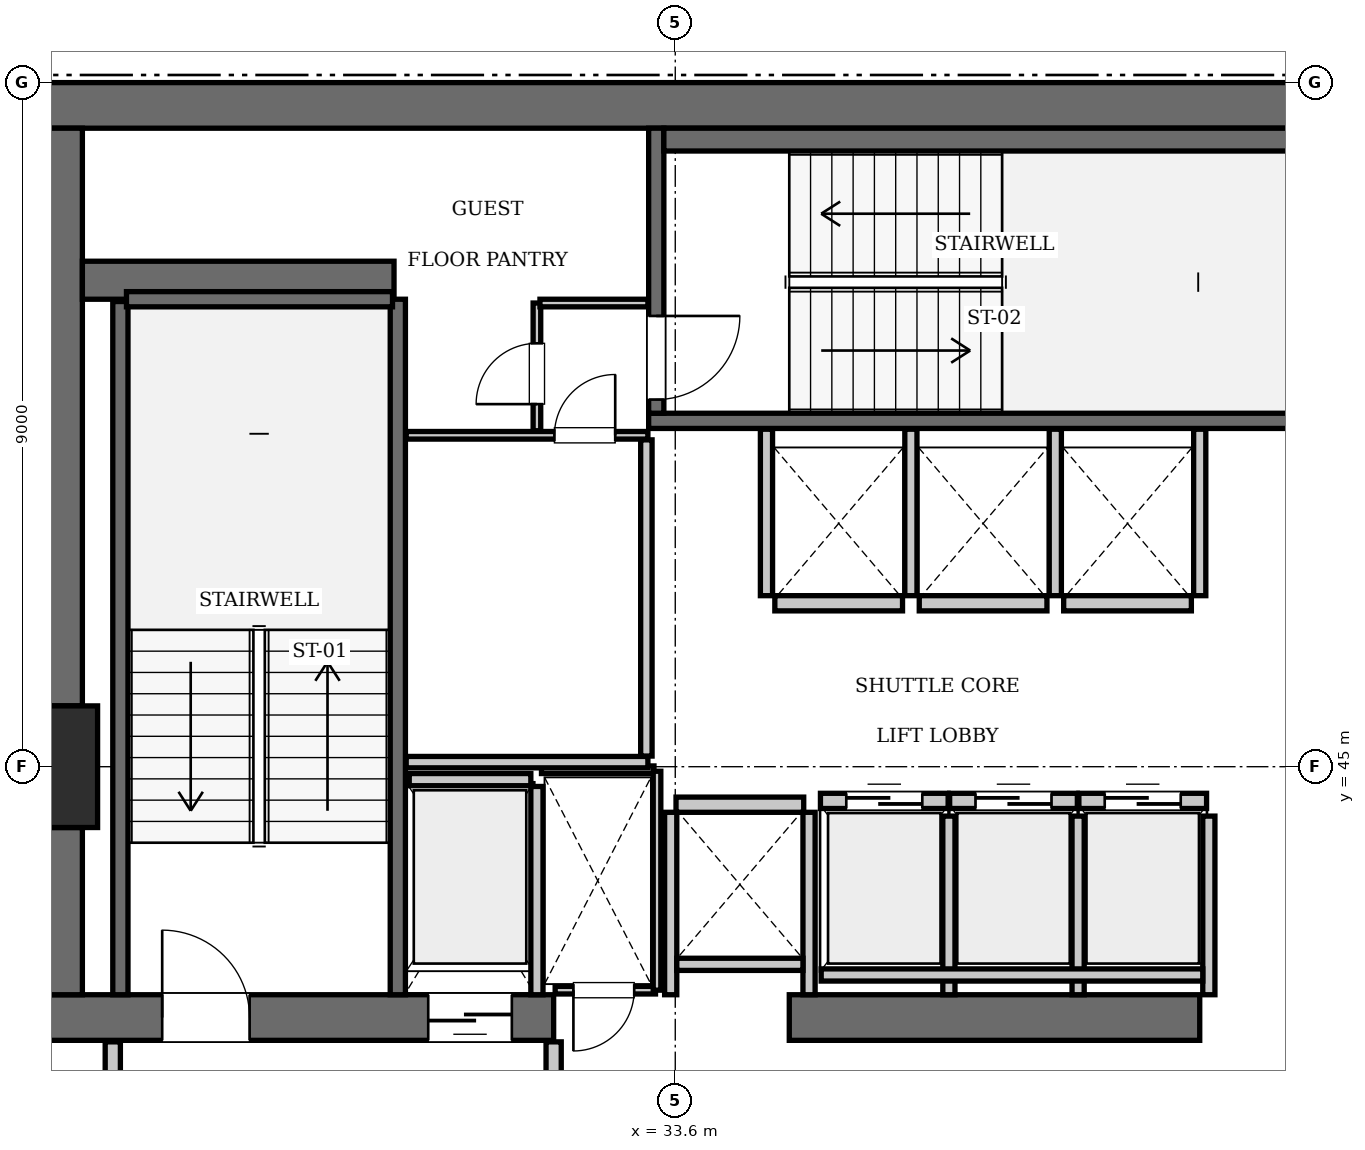
"""IFC4 building model, lengths in metres.
Left out: names, types, materials, properties, quantities, classifications, styles, units other than length and angle.
Written with IfcOpenShell. Run it as: python <this file> out.ifc"""

import sys

from ifc_helpers import new_model, si_unit, direction, frame, frame_2d, origin, origin_2d, place, context, subcontext, project, spatial, rectangle, extrude, element, fill, save


model = new_model("IFC4")
c1 = context("Model", 3, precision=1e-05, world=origin(), true_north=direction((0.0, 1.0)))
c2 = subcontext(c1, "Body", "Model", "MODEL_VIEW")
j1 = project(units=[si_unit("LENGTHUNIT", "METRE"), si_unit("PLANEANGLEUNIT", "RADIAN")], contexts=[c1])
p1 = place(None, origin())
s1 = spatial("IfcSite", under=j1, at=p1, CompositionType="ELEMENT")
p2 = place(p1, origin())
s2 = spatial("IfcBuilding", under=s1, at=p2, CompositionType="ELEMENT")
p3 = place(p2, frame((0.0, 0.0, 308.7)))
s3 = spatial("IfcBuildingStorey", under=s2, at=p3, CompositionType="ELEMENT", Elevation=308.7)
p4 = place(p3, frame((25.2, 45.0, 0.0), z_axis=(0.0, 0.0, 1.0), x_axis=(1.0, 0.0, 0.0)))
e1 = element("IfcColumn", 1, at=p4, inside=s3, PredefinedType="COLUMN", context=c2, shape_type="SweptSolid", body=[
    extrude(rectangle(XDim=1.6, YDim=1.6, at=origin_2d()), origin(), (0.0, 0.0, 1.0), 3.85),
])
p5 = place(p3, frame((25.2, 53.7, 0.0), z_axis=(0.0, 0.0, 1.0), x_axis=(1.0, 0.0, 0.0)))
e2 = element("IfcWall", 2, at=p5, inside=s3, PredefinedType="SHEAR", context=c2, shape_type="SweptSolid", body=[
    extrude(rectangle(XDim=25.2, YDim=0.6, at=frame_2d((12.6, 0.0))), origin(), (0.0, 0.0, 1.0), 3.85),
])
p6 = place(p3, frame((25.2, 41.7, 0.0), z_axis=(0.0, 0.0, 1.0), x_axis=(1.0, 0.0, 0.0)))
e3 = element("IfcWall", 3, at=p6, inside=s3, PredefinedType="SHEAR", context=c2, shape_type="SweptSolid", body=[
    extrude(rectangle(XDim=6.8, YDim=0.6, at=frame_2d((3.4, 0.0))), origin(), (0.0, 0.0, 1.0), 3.85),
])
p7 = place(p6, frame((1.65, 0.0, 0.0)))
e4 = element("IfcOpeningElement", 4, at=p7, cuts=e3, PredefinedType="OPENING", context=c2, shape_type="SweptSolid", body=[
    extrude(rectangle(XDim=1.15, YDim=2.15, at=frame_2d((0.575, 1.075))), frame((0.0, 0.31, 0.0), z_axis=(0.0, -1.0, 0.0), x_axis=(1.0, 0.0, 0.0)), (0.0, 0.0, 1.0), 0.62),
])
p8 = place(p6, frame((5.15, 0.0, 0.0)))
e5 = element("IfcOpeningElement", 5, at=p8, cuts=e3, PredefinedType="OPENING", context=c2, shape_type="SweptSolid", body=[
    extrude(rectangle(XDim=1.1, YDim=2.2, at=frame_2d((0.55, 1.1))), frame((0.0, 0.31, 0.0), z_axis=(0.0, -1.0, 0.0), x_axis=(1.0, 0.0, 0.0)), (0.0, 0.0, 1.0), 0.62),
])
p9 = place(p3, frame((35.1, 41.7, 0.0), z_axis=(0.0, 0.0, 1.0), x_axis=(1.0, 0.0, 0.0)))
e6 = element("IfcWall", 6, at=p9, inside=s3, PredefinedType="SHEAR", context=c2, shape_type="SweptSolid", body=[
    extrude(rectangle(XDim=5.4, YDim=0.6, at=frame_2d((2.7, 0.0))), origin(), (0.0, 0.0, 1.0), 3.85),
])
p10 = place(p3, frame((25.5, 42.0, 0.0), z_axis=(0.0, 0.0, 1.0), x_axis=(0.0, 1.0, 0.0)))
e7 = element("IfcWall", 7, at=p10, inside=s3, PredefinedType="SHEAR", context=c2, shape_type="SweptSolid", body=[
    extrude(rectangle(XDim=2.2, YDim=0.6, at=frame_2d((1.1, 0.0))), origin(), (0.0, 0.0, 1.0), 3.85),
])
p11 = place(p3, frame((25.5, 45.8, 0.0), z_axis=(0.0, 0.0, 1.0), x_axis=(0.0, 1.0, 0.0)))
e8 = element("IfcWall", 8, at=p11, inside=s3, PredefinedType="SHEAR", context=c2, shape_type="SweptSolid", body=[
    extrude(rectangle(XDim=7.6, YDim=0.6, at=frame_2d((3.8, 0.0))), origin(), (0.0, 0.0, 1.0), 3.85),
])
p12 = place(p3, frame((25.8, 51.4, 0.0), z_axis=(0.0, 0.0, 1.0), x_axis=(1.0, 0.0, 0.0)))
e9 = element("IfcWall", 9, at=p12, inside=s3, PredefinedType="SHEAR", context=c2, shape_type="SweptSolid", body=[
    extrude(rectangle(XDim=4.1, YDim=0.5, at=frame_2d((2.05, 0.0))), origin(), (0.0, 0.0, 1.0), 3.85),
])
p13 = place(p3, frame((29.95, 42.0, 0.0), z_axis=(0.0, 0.0, 1.0), x_axis=(0.0, 1.0, 0.0)))
e10 = element("IfcWall", 10, at=p13, inside=s3, PredefinedType="SOLIDWALL", context=c2, shape_type="SweptSolid", body=[
    extrude(rectangle(XDim=9.15, YDim=0.2, at=frame_2d((4.575, 0.0))), origin(), (0.0, 0.0, 1.0), 3.61),
])
p14 = place(p3, frame((26.3, 42.0, 0.0), z_axis=(0.0, 0.0, 1.0), x_axis=(0.0, 1.0, 0.0)))
e11 = element("IfcWall", 11, at=p14, inside=s3, PredefinedType="SOLIDWALL", context=c2, shape_type="SweptSolid", body=[
    extrude(rectangle(XDim=9.12, YDim=0.2, at=frame_2d((4.56, 0.0))), origin(), (0.0, 0.0, 1.0), 3.61),
])
p15 = place(p3, frame((26.38, 51.15, 0.0), z_axis=(0.0, 0.0, 1.0), x_axis=(1.0, 0.0, 0.0)))
e12 = element("IfcWall", 12, at=p15, inside=s3, PredefinedType="SOLIDWALL", context=c2, shape_type="SweptSolid", body=[
    extrude(rectangle(XDim=3.5, YDim=0.2, at=frame_2d((1.75, 0.0))), origin(), (0.0, 0.0, 1.0), 3.61),
])
p16 = place(p3, frame((33.25, 49.55, 0.0), z_axis=(0.0, 0.0, 1.0), x_axis=(1.0, 0.0, 0.0)))
e13 = element("IfcWall", 13, at=p16, inside=s3, PredefinedType="SOLIDWALL", context=c2, shape_type="SweptSolid", body=[
    extrude(rectangle(XDim=9.1, YDim=0.2, at=frame_2d((4.55, 0.0))), origin(), (0.0, 0.0, 1.0), 3.61),
])
p17 = place(p3, frame((33.35, 49.65, 0.0), z_axis=(0.0, 0.0, 1.0), x_axis=(0.0, 1.0, 0.0)))
e14 = element("IfcWall", 14, at=p17, inside=s3, PredefinedType="SOLIDWALL", context=c2, shape_type="SweptSolid", body=[
    extrude(rectangle(XDim=3.75, YDim=0.2, at=frame_2d((1.875, 0.0))), origin(), (0.0, 0.0, 1.0), 3.61),
])
p18 = place(p17, frame((0.18, 0.0, 0.0)))
e15 = element("IfcOpeningElement", 15, at=p18, cuts=e14, PredefinedType="OPENING", context=c2, shape_type="SweptSolid", body=[
    extrude(rectangle(XDim=1.1, YDim=2.15, at=frame_2d((0.55, 1.075))), frame((0.0, 0.11, 0.0), z_axis=(0.0, -1.0, 0.0), x_axis=(1.0, 0.0, 0.0)), (0.0, 0.0, 1.0), 0.22),
])
p19 = place(p3, frame((33.45, 53.25, 0.0), z_axis=(0.0, 0.0, 1.0), x_axis=(1.0, 0.0, 0.0)))
e16 = element("IfcWall", 16, at=p19, inside=s3, PredefinedType="SOLIDWALL", context=c2, shape_type="SweptSolid", body=[
    extrude(rectangle(XDim=8.7, YDim=0.3, at=frame_2d((4.35, 0.0))), origin(), (0.0, 0.0, 1.0), 3.61),
])
p20 = place(p3, frame((35.51, 44.55, 0.0), z_axis=(0.0, 0.0, 1.0), x_axis=(1.0, 0.0, 0.0)))
e17 = element("IfcWall", 17, at=p20, inside=s3, PredefinedType="SOLIDWALL", context=c2, shape_type="SweptSolid", body=[
    extrude(rectangle(XDim=1.68, YDim=0.2, at=frame_2d((0.84, 0.0))), origin(), (0.0, 0.0, 1.0), 3.61),
])
p21 = place(p20, frame((0.34, 0.0, 0.0)))
e18 = element("IfcOpeningElement", 18, at=p21, cuts=e17, PredefinedType="OPENING", context=c2, shape_type="SweptSolid", body=[
    extrude(rectangle(XDim=1.0, YDim=2.15, at=frame_2d((0.5, 1.075))), frame((0.0, 0.11, 0.0), z_axis=(0.0, -1.0, 0.0), x_axis=(1.0, 0.0, 0.0)), (0.0, 0.0, 1.0), 0.22),
])
p22 = place(p3, frame((37.21, 44.55, 0.0), z_axis=(0.0, 0.0, 1.0), x_axis=(1.0, 0.0, 0.0)))
e19 = element("IfcWall", 19, at=p22, inside=s3, PredefinedType="SOLIDWALL", context=c2, shape_type="SweptSolid", body=[
    extrude(rectangle(XDim=1.68, YDim=0.2, at=frame_2d((0.84, 0.0))), origin(), (0.0, 0.0, 1.0), 3.61),
])
p23 = place(p22, frame((0.34, 0.0, 0.0)))
e20 = element("IfcOpeningElement", 20, at=p23, cuts=e19, PredefinedType="OPENING", context=c2, shape_type="SweptSolid", body=[
    extrude(rectangle(XDim=1.0, YDim=2.15, at=frame_2d((0.5, 1.075))), frame((0.0, 0.11, 0.0), z_axis=(0.0, -1.0, 0.0), x_axis=(1.0, 0.0, 0.0)), (0.0, 0.0, 1.0), 0.22),
])
p24 = place(p3, frame((38.91, 44.55, 0.0), z_axis=(0.0, 0.0, 1.0), x_axis=(1.0, 0.0, 0.0)))
e21 = element("IfcWall", 21, at=p24, inside=s3, PredefinedType="SOLIDWALL", context=c2, shape_type="SweptSolid", body=[
    extrude(rectangle(XDim=1.68, YDim=0.2, at=frame_2d((0.84, 0.0))), origin(), (0.0, 0.0, 1.0), 3.61),
])
p25 = place(p24, frame((0.34, 0.0, 0.0)))
e22 = element("IfcOpeningElement", 22, at=p25, cuts=e21, PredefinedType="OPENING", context=c2, shape_type="SweptSolid", body=[
    extrude(rectangle(XDim=1.0, YDim=2.15, at=frame_2d((0.5, 1.075))), frame((0.0, 0.11, 0.0), z_axis=(0.0, -1.0, 0.0), x_axis=(1.0, 0.0, 0.0)), (0.0, 0.0, 1.0), 0.22),
])
p26 = place(p3, frame((34.91, 47.15, 0.0), z_axis=(0.0, 0.0, 1.0), x_axis=(1.0, 0.0, 0.0)))
e23 = element("IfcWall", 23, at=p26, inside=s3, PredefinedType="SOLIDWALL", context=c2, shape_type="SweptSolid", body=[
    extrude(rectangle(XDim=1.68, YDim=0.2, at=frame_2d((0.84, 0.0))), origin(), (0.0, 0.0, 1.0), 3.61),
])
for number, where, z_axis, x_axis in (
    (24, (36.81, 47.15, 0.0), (0.0, 0.0, 1.0), (1.0, 0.0, 0.0)),
    (25, (38.71, 47.15, 0.0), (0.0, 0.0, 1.0), (1.0, 0.0, 0.0)),
    (26, (33.61, 44.5, 0.0), (0.0, 0.0, 1.0), (1.0, 0.0, 0.0)),
):
    element("IfcWall", number, at=place(p3, frame(where, z_axis=z_axis, x_axis=x_axis)), inside=s3, PredefinedType="SOLIDWALL", context=c2, shape_type="SweptSolid", body=[
        extrude(rectangle(XDim=1.68, YDim=0.2, at=frame_2d((0.84, 0.0))), origin(), (0.0, 0.0, 1.0), 3.61),
    ])
p27 = place(p3, frame((30.1, 44.83, 0.0), z_axis=(0.0, 0.0, 1.0), x_axis=(1.0, 0.0, 0.0)))
e27 = element("IfcWall", 27, at=p27, inside=s3, PredefinedType="SOLIDWALL", context=c2, shape_type="SweptSolid", body=[
    extrude(rectangle(XDim=1.6, YDim=0.16, at=frame_2d((0.8, 0.0))), origin(), (0.0, 0.0, 1.0), 3.61),
])
p28 = place(p3, frame((31.78, 42.0, 0.0), z_axis=(0.0, 0.0, 1.0), x_axis=(0.0, 1.0, 0.0)))
e28 = element("IfcWall", 28, at=p28, inside=s3, PredefinedType="SOLIDWALL", context=c2, shape_type="SweptSolid", body=[
    extrude(rectangle(XDim=2.74, YDim=0.16, at=frame_2d((1.37, 0.0))), origin(), (0.0, 0.0, 1.0), 3.61),
])
for number, where, z_axis, x_axis in (
    (29, (37.2, 42.0, 0.0), (0.0, 0.0, 1.0), (0.0, 1.0, 0.0)),
    (30, (38.9, 42.0, 0.0), (0.0, 0.0, 1.0), (0.0, 1.0, 0.0)),
    (31, (40.62, 42.0, 0.0), (0.0, 0.0, 1.0), (0.0, 1.0, 0.0)),
):
    element("IfcWall", number, at=place(p3, frame(where, z_axis=z_axis, x_axis=x_axis)), inside=s3, PredefinedType="SOLIDWALL", context=c2, shape_type="SweptSolid", body=[
        extrude(rectangle(XDim=2.35, YDim=0.16, at=frame_2d((1.175, 0.0))), origin(), (0.0, 0.0, 1.0), 3.61),
    ])
p29 = place(p3, frame((35.52, 42.26, 0.0), z_axis=(0.0, 0.0, 1.0), x_axis=(1.0, 0.0, 0.0)))
e32 = element("IfcWall", 32, at=p29, inside=s3, PredefinedType="SOLIDWALL", context=c2, shape_type="SweptSolid", body=[
    extrude(rectangle(XDim=5.02, YDim=0.16, at=frame_2d((2.51, 0.0))), origin(), (0.0, 0.0, 1.0), 3.61),
])
for number, where, z_axis, x_axis in (
    (33, (34.8, 47.25, 0.0), (0.0, 0.0, 1.0), (0.0, 1.0, 0.0)),
    (34, (36.7, 47.25, 0.0), (0.0, 0.0, 1.0), (0.0, 1.0, 0.0)),
    (35, (38.6, 47.25, 0.0), (0.0, 0.0, 1.0), (0.0, 1.0, 0.0)),
    (36, (40.5, 47.25, 0.0), (0.0, 0.0, 1.0), (0.0, 1.0, 0.0)),
):
    element("IfcWall", number, at=place(p3, frame(where, z_axis=z_axis, x_axis=x_axis)), inside=s3, PredefinedType="SOLIDWALL", context=c2, shape_type="SweptSolid", body=[
        extrude(rectangle(XDim=2.19, YDim=0.16, at=frame_2d((1.095, 0.0))), origin(), (0.0, 0.0, 1.0), 3.61),
    ])
for number, where, z_axis, x_axis in (
    (37, (33.54, 42.0, 0.0), (0.0, 0.0, 1.0), (0.0, 1.0, 0.0)),
    (38, (35.36, 42.0, 0.0), (0.0, 0.0, 1.0), (0.0, 1.0, 0.0)),
):
    element("IfcWall", number, at=place(p3, frame(where, z_axis=z_axis, x_axis=x_axis)), inside=s3, PredefinedType="SOLIDWALL", context=c2, shape_type="SweptSolid", body=[
        extrude(rectangle(XDim=2.4, YDim=0.16, at=frame_2d((1.2, 0.0))), origin(), (0.0, 0.0, 1.0), 3.61),
    ])
p30 = place(p3, frame((33.62, 42.4, 0.0), z_axis=(0.0, 0.0, 1.0), x_axis=(1.0, 0.0, 0.0)))
e39 = element("IfcWall", 39, at=p30, inside=s3, PredefinedType="SOLIDWALL", context=c2, shape_type="SweptSolid", body=[
    extrude(rectangle(XDim=1.66, YDim=0.16, at=frame_2d((0.83, 0.0))), origin(), (0.0, 0.0, 1.0), 3.61),
])
for number, where, z_axis, x_axis in (
    (40, (26.2, 38.31, 0.0), (0.0, 0.0, 1.0), (0.0, 1.0, 0.0)),
    (41, (32.0, 38.31, 0.0), (0.0, 0.0, 1.0), (0.0, 1.0, 0.0)),
):
    element("IfcWall", number, at=place(p3, frame(where, z_axis=z_axis, x_axis=x_axis)), inside=s3, PredefinedType="PARTITIONING", context=c2, shape_type="SweptSolid", body=[
        extrude(rectangle(XDim=3.07, YDim=0.2, at=frame_2d((1.535, 0.0))), origin(), (0.0, 0.0, 1.0), 3.61),
    ])
p31 = place(p3, frame((32.02, 42.06, 0.0), z_axis=(0.0, 0.0, 1.0), x_axis=(1.0, 0.0, 0.0)))
e42 = element("IfcWall", 42, at=p31, inside=s3, PredefinedType="PARTITIONING", context=c2, shape_type="SweptSolid", body=[
    extrude(rectangle(XDim=1.32, YDim=0.1, at=frame_2d((0.66, 0.0))), origin(), (0.0, 0.0, 1.0), 3.61),
])
p32 = place(p31, frame((0.24, 0.0, 0.0)))
e43 = element("IfcOpeningElement", 43, at=p32, cuts=e42, PredefinedType="OPENING", context=c2, shape_type="SweptSolid", body=[
    extrude(rectangle(XDim=0.8, YDim=2.05, at=frame_2d((0.4, 1.025))), frame((0.0, 0.06, 0.0), z_axis=(0.0, -1.0, 0.0), x_axis=(1.0, 0.0, 0.0)), (0.0, 0.0, 1.0), 0.12),
])
p33 = place(p3, frame((31.84, 44.96, 0.0), z_axis=(0.0, 0.0, 1.0), x_axis=(1.0, 0.0, 0.0)))
e44 = element("IfcWall", 44, at=p33, inside=s3, PredefinedType="PARTITIONING", context=c2, shape_type="SweptSolid", body=[
    extrude(rectangle(XDim=1.48, YDim=0.1, at=frame_2d((0.74, 0.0))), origin(), (0.0, 0.0, 1.0), 3.61),
])
p34 = place(p3, frame((33.36, 42.06, 0.0), z_axis=(0.0, 0.0, 1.0), x_axis=(0.0, 1.0, 0.0)))
e45 = element("IfcWall", 45, at=p34, inside=s3, PredefinedType="PARTITIONING", context=c2, shape_type="SweptSolid", body=[
    extrude(rectangle(XDim=2.88, YDim=0.1, at=frame_2d((1.44, 0.0))), origin(), (0.0, 0.0, 1.0), 3.61),
])
p35 = place(p3, frame((30.06, 45.06, 0.0), z_axis=(0.0, 0.0, 1.0), x_axis=(1.0, 0.0, 0.0)))
e46 = element("IfcWall", 46, at=p35, inside=s3, PredefinedType="PARTITIONING", context=c2, shape_type="SweptSolid", body=[
    extrude(rectangle(XDim=3.18, YDim=0.15, at=frame_2d((1.59, 0.0))), origin(), (0.0, 0.0, 1.0), 3.61),
])
p36 = place(p3, frame((33.22, 45.14, 0.0), z_axis=(0.0, 0.0, 1.0), x_axis=(0.0, 1.0, 0.0)))
e47 = element("IfcWall", 47, at=p36, inside=s3, PredefinedType="PARTITIONING", context=c2, shape_type="SweptSolid", body=[
    extrude(rectangle(XDim=4.16, YDim=0.15, at=frame_2d((2.08, 0.0))), origin(), (0.0, 0.0, 1.0), 3.61),
])
p37 = place(p3, frame((30.06, 49.36, 0.0), z_axis=(0.0, 0.0, 1.0), x_axis=(1.0, 0.0, 0.0)))
e48 = element("IfcWall", 48, at=p37, inside=s3, PredefinedType="PARTITIONING", context=c2, shape_type="SweptSolid", body=[
    extrude(rectangle(XDim=3.18, YDim=0.1, at=frame_2d((1.59, 0.0))), origin(), (0.0, 0.0, 1.0), 3.61),
])
p38 = place(p37, frame((1.95, 0.0, 0.0)))
e49 = element("IfcOpeningElement", 49, at=p38, cuts=e48, PredefinedType="OPENING", context=c2, shape_type="SweptSolid", body=[
    extrude(rectangle(XDim=0.8, YDim=2.05, at=frame_2d((0.4, 1.025))), frame((0.0, 0.06, 0.0), z_axis=(0.0, -1.0, 0.0), x_axis=(1.0, 0.0, 0.0)), (0.0, 0.0, 1.0), 0.12),
])
p39 = place(p3, frame((31.78, 49.42, 0.0), z_axis=(0.0, 0.0, 1.0), x_axis=(0.0, 1.0, 0.0)))
e50 = element("IfcWall", 50, at=p39, inside=s3, PredefinedType="PARTITIONING", context=c2, shape_type="SweptSolid", body=[
    extrude(rectangle(XDim=1.68, YDim=0.1, at=frame_2d((0.84, 0.0))), origin(), (0.0, 0.0, 1.0), 3.61),
])
p40 = place(p39, frame((0.35, 0.0, 0.0)))
e51 = element("IfcOpeningElement", 51, at=p40, cuts=e50, PredefinedType="OPENING", context=c2, shape_type="SweptSolid", body=[
    extrude(rectangle(XDim=0.8, YDim=2.05, at=frame_2d((0.4, 1.025))), frame((0.0, 0.06, 0.0), z_axis=(0.0, -1.0, 0.0), x_axis=(1.0, 0.0, 0.0)), (0.0, 0.0, 1.0), 0.12),
])
p41 = place(p3, frame((31.82, 51.1, 0.0), z_axis=(0.0, 0.0, 1.0), x_axis=(1.0, 0.0, 0.0)))
e52 = element("IfcWall", 52, at=p41, inside=s3, PredefinedType="PARTITIONING", context=c2, shape_type="SweptSolid", body=[
    extrude(rectangle(XDim=1.42, YDim=0.1, at=frame_2d((0.71, 0.0))), origin(), (0.0, 0.0, 1.0), 3.61),
])
p42 = place(p7, origin())
e53 = element("IfcDoor", 53, at=p42, inside=s3, OperationType="SINGLE_SWING_LEFT", PredefinedType="DOOR", context=c2, shape_type="SweptSolid", body=[
    extrude(rectangle(XDim=1.15, YDim=2.15, at=frame_2d((0.575, 1.075))), frame((0.0, 0.025, 0.0), z_axis=(0.0, -1.0, 0.0), x_axis=(1.0, 0.0, 0.0)), (0.0, 0.0, 1.0), 0.05),
])
fill(e4, e53)
p43 = place(p18, frame((1.1, 0.0, 0.0), z_axis=(0.0, 0.0, 1.0), x_axis=(-1.0, 0.0, 0.0)))
e54 = element("IfcDoor", 54, at=p43, inside=s3, OperationType="SINGLE_SWING_LEFT", PredefinedType="DOOR", context=c2, shape_type="SweptSolid", body=[
    extrude(rectangle(XDim=1.1, YDim=2.15, at=frame_2d((0.55, 1.075))), frame((0.0, 0.025, 0.0), z_axis=(0.0, -1.0, 0.0), x_axis=(1.0, 0.0, 0.0)), (0.0, 0.0, 1.0), 0.05),
])
fill(e15, e54)
p44 = place(p21, origin())
e55 = element("IfcDoor", 55, at=p44, inside=s3, OperationType="SLIDING_TO_LEFT", PredefinedType="DOOR", context=c2, shape_type="SweptSolid", body=[
    extrude(rectangle(XDim=1.0, YDim=2.15, at=frame_2d((0.5, 1.075))), frame((0.0, 0.025, 0.0), z_axis=(0.0, -1.0, 0.0), x_axis=(1.0, 0.0, 0.0)), (0.0, 0.0, 1.0), 0.05),
])
fill(e18, e55)
p45 = place(p23, origin())
e56 = element("IfcDoor", 56, at=p45, inside=s3, OperationType="SLIDING_TO_LEFT", PredefinedType="DOOR", context=c2, shape_type="SweptSolid", body=[
    extrude(rectangle(XDim=1.0, YDim=2.15, at=frame_2d((0.5, 1.075))), frame((0.0, 0.025, 0.0), z_axis=(0.0, -1.0, 0.0), x_axis=(1.0, 0.0, 0.0)), (0.0, 0.0, 1.0), 0.05),
])
fill(e20, e56)
p46 = place(p25, origin())
e57 = element("IfcDoor", 57, at=p46, inside=s3, OperationType="SLIDING_TO_LEFT", PredefinedType="DOOR", context=c2, shape_type="SweptSolid", body=[
    extrude(rectangle(XDim=1.0, YDim=2.15, at=frame_2d((0.5, 1.075))), frame((0.0, 0.025, 0.0), z_axis=(0.0, -1.0, 0.0), x_axis=(1.0, 0.0, 0.0)), (0.0, 0.0, 1.0), 0.05),
])
fill(e22, e57)
p47 = place(p8, frame((1.1, 0.0, 0.0), z_axis=(0.0, 0.0, 1.0), x_axis=(-1.0, 0.0, 0.0)))
e58 = element("IfcDoor", 58, at=p47, inside=s3, OperationType="SLIDING_TO_LEFT", PredefinedType="DOOR", context=c2, shape_type="SweptSolid", body=[
    extrude(rectangle(XDim=1.1, YDim=2.2, at=frame_2d((0.55, 1.1))), frame((0.0, 0.025, 0.0), z_axis=(0.0, -1.0, 0.0), x_axis=(1.0, 0.0, 0.0)), (0.0, 0.0, 1.0), 0.05),
])
fill(e5, e58)
p48 = place(p32, frame((0.8, 0.0, 0.0), z_axis=(0.0, 0.0, 1.0), x_axis=(-1.0, 0.0, 0.0)))
e59 = element("IfcDoor", 59, at=p48, inside=s3, OperationType="SINGLE_SWING_RIGHT", PredefinedType="DOOR", context=c2, shape_type="SweptSolid", body=[
    extrude(rectangle(XDim=0.8, YDim=2.05, at=frame_2d((0.4, 1.025))), frame((0.0, 0.025, 0.0), z_axis=(0.0, -1.0, 0.0), x_axis=(1.0, 0.0, 0.0)), (0.0, 0.0, 1.0), 0.05),
])
fill(e43, e59)
p49 = place(p38, origin())
e60 = element("IfcDoor", 60, at=p49, inside=s3, OperationType="SINGLE_SWING_RIGHT", PredefinedType="DOOR", context=c2, shape_type="SweptSolid", body=[
    extrude(rectangle(XDim=0.8, YDim=2.05, at=frame_2d((0.4, 1.025))), frame((0.0, 0.025, 0.0), z_axis=(0.0, -1.0, 0.0), x_axis=(1.0, 0.0, 0.0)), (0.0, 0.0, 1.0), 0.05),
])
fill(e49, e60)
p50 = place(p40, origin())
e61 = element("IfcDoor", 61, at=p50, inside=s3, OperationType="SINGLE_SWING_LEFT", PredefinedType="DOOR", context=c2, shape_type="SweptSolid", body=[
    extrude(rectangle(XDim=0.8, YDim=2.05, at=frame_2d((0.4, 1.025))), frame((0.0, 0.025, 0.0), z_axis=(0.0, -1.0, 0.0), x_axis=(1.0, 0.0, 0.0)), (0.0, 0.0, 1.0), 0.05),
])
fill(e51, e61)
save(model, sys.argv[1])
